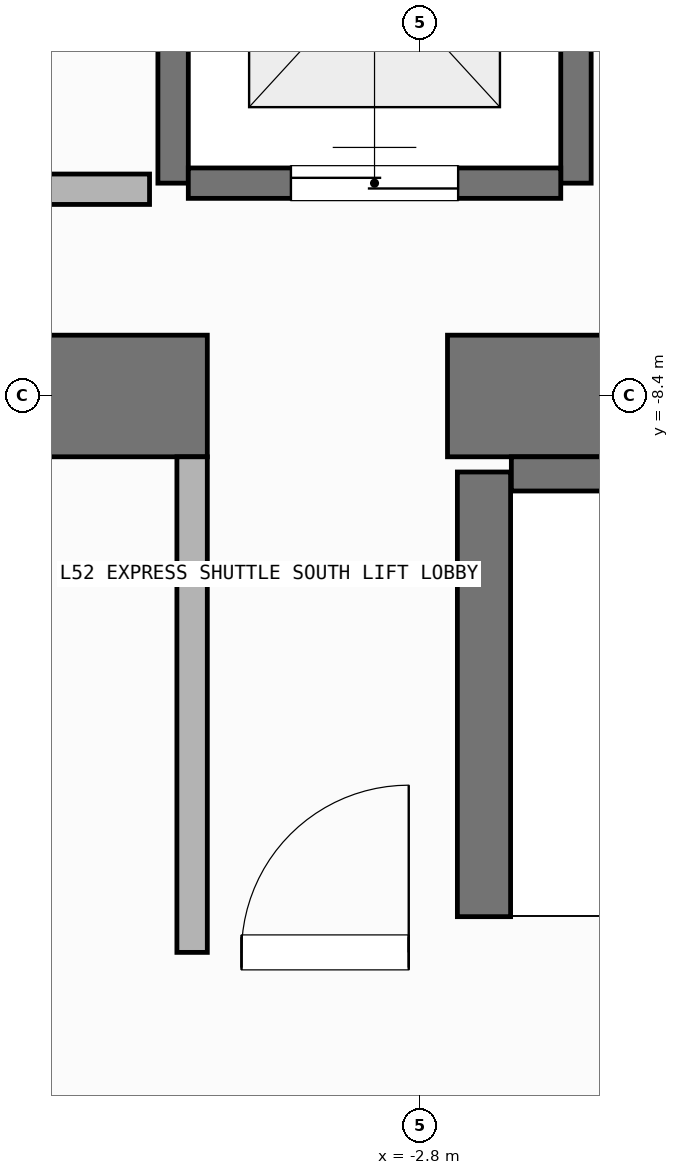
"""IFC4 building model, lengths in metres.
Left out: names, types, materials, properties, quantities, classifications, styles, units other than length and angle.
Written with IfcOpenShell. Run it as: python <this file> out.ifc"""

import sys

from ifc_helpers import new_model, si_unit, direction, frame, frame_2d, origin, place, context, subcontext, project, spatial, rectangle, extrude, element, fill, save


model = new_model("IFC4")
c1 = context("Model", 3, precision=1e-05, world=origin(), true_north=direction((0.0, 1.0)))
c2 = subcontext(c1, "Body", "Model", "MODEL_VIEW")
j1 = project(units=[si_unit("LENGTHUNIT", "METRE"), si_unit("PLANEANGLEUNIT", "RADIAN")], contexts=[c1])
p1 = place(None, origin())
s1 = spatial("IfcSite", under=j1, at=p1, CompositionType="ELEMENT")
p2 = place(p1, origin())
s2 = spatial("IfcBuilding", under=s1, at=p2, CompositionType="ELEMENT")
p3 = place(p2, frame((0.0, 0.0, 210.9)))
s3 = spatial("IfcBuildingStorey", under=s2, at=p3, CompositionType="ELEMENT", Elevation=210.9)
p4 = place(p3, frame((-7.55, -8.4, 0.0), z_axis=(0.0, 0.0, 1.0), x_axis=(1.0, 0.0, 0.0)))
e1 = element("IfcWall", 1, at=p4, inside=s3, PredefinedType="SHEAR", context=c2, shape_type="SweptSolid", body=[
    extrude(rectangle(XDim=3.35, YDim=0.8, at=frame_2d((1.675, 0.0))), origin(), (0.0, 0.0, 1.0), 4.8),
])
p5 = place(p3, frame((-2.62, -8.4, 0.0), z_axis=(0.0, 0.0, 1.0), x_axis=(1.0, 0.0, 0.0)))
e2 = element("IfcWall", 2, at=p5, inside=s3, PredefinedType="SHEAR", context=c2, shape_type="SweptSolid", body=[
    extrude(rectangle(XDim=7.27, YDim=0.8, at=frame_2d((3.635, 0.0))), origin(), (0.0, 0.0, 1.0), 4.8),
])
p6 = place(p3, frame((-2.555, -12.0, 0.0), z_axis=(0.0, 0.0, 1.0), x_axis=(1.0, 0.0, 0.0)))
e3 = element("IfcWall", 3, at=p6, inside=s3, PredefinedType="SHEAR", context=c2, shape_type="SweptSolid", body=[
    extrude(rectangle(XDim=7.31, YDim=0.35, at=frame_2d((3.655, 0.0))), origin(), (0.0, 0.0, 1.0), 4.8),
])
p7 = place(p3, frame((-2.2, -8.913, 0.0), z_axis=(0.0, 0.0, 1.0), x_axis=(1.0, 0.0, 0.0)))
e4 = element("IfcWall", 4, at=p7, inside=s3, PredefinedType="SHEAR", context=c2, shape_type="SweptSolid", body=[
    extrude(rectangle(XDim=6.6, YDim=0.225, at=frame_2d((3.3, 0.0))), origin(), (0.0, 0.0, 1.0), 4.8),
])
p8 = place(p3, frame((-2.38, -11.825, 0.0), z_axis=(0.0, 0.0, 1.0), x_axis=(0.0, 1.0, 0.0)))
e5 = element("IfcWall", 5, at=p8, inside=s3, PredefinedType="SHEAR", context=c2, shape_type="SweptSolid", body=[
    extrude(rectangle(XDim=2.925, YDim=0.35, at=frame_2d((1.462, 0.0))), origin(), (0.0, 0.0, 1.0), 4.8),
])
for number, where, z_axis, x_axis in (
    (6, (-4.425, -7.0, 0.0), (0.0, 0.0, 1.0), (0.0, 1.0, 0.0)),
    (7, (-1.775, -7.0, 0.0), (0.0, 0.0, 1.0), (0.0, 1.0, 0.0)),
):
    element("IfcWall", number, at=place(p3, frame(where, z_axis=z_axis, x_axis=x_axis)), inside=s3, PredefinedType="SHEAR", context=c2, shape_type="SweptSolid", body=[
        extrude(rectangle(XDim=2.8, YDim=0.2, at=frame_2d((1.4, 0.0))), origin(), (0.0, 0.0, 1.0), 4.58),
    ])
p9 = place(p3, frame((-4.325, -7.0, 0.0), z_axis=(0.0, 0.0, 1.0), x_axis=(1.0, 0.0, 0.0)))
e8 = element("IfcWall", 8, at=p9, inside=s3, PredefinedType="SHEAR", context=c2, shape_type="SweptSolid", body=[
    extrude(rectangle(XDim=2.45, YDim=0.2, at=frame_2d((1.225, 0.0))), origin(), (0.0, 0.0, 1.0), 4.58),
])
p10 = place(p9, frame((0.675, 0.0, 0.0)))
e9 = element("IfcOpeningElement", 9, at=p10, cuts=e8, PredefinedType="OPENING", context=c2, shape_type="SweptSolid", body=[
    extrude(rectangle(XDim=1.1, YDim=2.2, at=frame_2d((0.55, 1.1))), frame((0.0, 0.11, 0.0), z_axis=(0.0, -1.0, 0.0), x_axis=(1.0, 0.0, 0.0)), (0.0, 0.0, 1.0), 0.22),
])
p11 = place(p3, frame((-4.3, -12.06, 0.0), z_axis=(0.0, 0.0, 1.0), x_axis=(1.0, 0.0, 0.0)))
e10 = element("IfcWall", 10, at=p11, inside=s3, PredefinedType="SOLIDWALL", context=c2, shape_type="SweptSolid", body=[
    extrude(rectangle(XDim=1.75, YDim=0.2, at=frame_2d((0.875, 0.0))), origin(), (0.0, 0.0, 1.0), 4.58),
])
p12 = place(p11, frame((0.325, 0.0, 0.0)))
e11 = element("IfcOpeningElement", 11, at=p12, cuts=e10, PredefinedType="OPENING", context=c2, shape_type="SweptSolid", body=[
    extrude(rectangle(XDim=1.1, YDim=2.15, at=frame_2d((0.55, 1.075))), frame((0.0, 0.11, 0.0), z_axis=(0.0, -1.0, 0.0), x_axis=(1.0, 0.0, 0.0)), (0.0, 0.0, 1.0), 0.22),
])
p13 = place(p3, frame((-4.3, -12.06, 0.0), z_axis=(0.0, 0.0, 1.0), x_axis=(0.0, 1.0, 0.0)))
e12 = element("IfcWall", 12, at=p13, inside=s3, PredefinedType="SOLIDWALL", context=c2, shape_type="SweptSolid", body=[
    extrude(rectangle(XDim=3.26, YDim=0.2, at=frame_2d((1.63, 0.0))), origin(), (0.0, 0.0, 1.0), 4.58),
])
p14 = place(p3, frame((-7.38, -7.04, 0.0), z_axis=(0.0, 0.0, 1.0), x_axis=(1.0, 0.0, 0.0)))
e13 = element("IfcWall", 13, at=p14, inside=s3, PredefinedType="SOLIDWALL", context=c2, shape_type="SweptSolid", body=[
    extrude(rectangle(XDim=2.8, YDim=0.2, at=frame_2d((1.4, 0.0))), origin(), (0.0, 0.0, 1.0), 4.58),
])
p15 = place(p10, origin())
e14 = element("IfcDoor", 14, at=p15, inside=s3, OperationType="SLIDING_TO_LEFT", PredefinedType="DOOR", context=c2, shape_type="SweptSolid", body=[
    extrude(rectangle(XDim=1.1, YDim=2.2, at=frame_2d((0.55, 1.1))), frame((0.0, 0.025, 0.0), z_axis=(0.0, -1.0, 0.0), x_axis=(1.0, 0.0, 0.0)), (0.0, 0.0, 1.0), 0.05),
])
fill(e9, e14)
p16 = place(p12, origin())
e15 = element("IfcDoor", 15, at=p16, inside=s3, OperationType="SINGLE_SWING_RIGHT", PredefinedType="DOOR", context=c2, shape_type="SweptSolid", body=[
    extrude(rectangle(XDim=1.1, YDim=2.15, at=frame_2d((0.55, 1.075))), frame((0.0, 0.025, 0.0), z_axis=(0.0, -1.0, 0.0), x_axis=(1.0, 0.0, 0.0)), (0.0, 0.0, 1.0), 0.05),
])
fill(e11, e15)
save(model, sys.argv[1])
